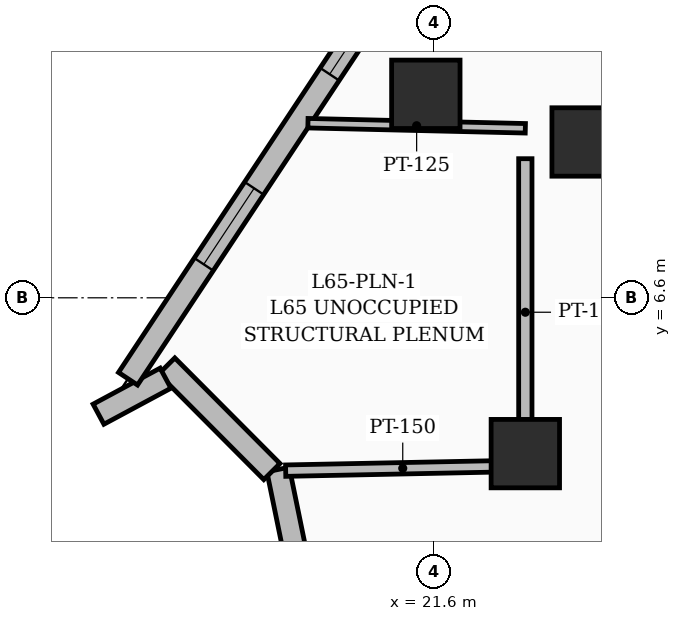
"""IFC4 building model, lengths in metres.
Left out: names, types, materials, properties, quantities, classifications, styles, units other than length and angle.
Written with IfcOpenShell. Run it as: python <this file> out.ifc"""

import sys

from ifc_helpers import new_model, si_unit, direction, frame, frame_2d, origin, origin_2d, place, context, subcontext, project, spatial, rectangle, extrude, element, fill, save


model = new_model("IFC4")
c1 = context("Model", 3, precision=1e-05, world=origin(), true_north=direction((0.0, 1.0)))
c2 = subcontext(c1, "Body", "Model", "MODEL_VIEW")
j1 = project(units=[si_unit("LENGTHUNIT", "METRE"), si_unit("PLANEANGLEUNIT", "RADIAN")], contexts=[c1])
p1 = place(None, origin())
s1 = spatial("IfcSite", under=j1, at=p1, CompositionType="ELEMENT")
p2 = place(p1, origin())
s2 = spatial("IfcBuilding", under=s1, at=p2, CompositionType="ELEMENT")
p3 = place(p2, frame((0.0, 0.0, 252.0)))
s3 = spatial("IfcBuildingStorey", under=s2, at=p3, CompositionType="ELEMENT", Elevation=252.0)
for number, where, z_axis, x_axis in (
    (1, (22.8, 4.55, 0.0), (0.0, 0.0, 1.0), (1.0, 0.0, 0.0)),
    (2, (23.6, 8.65, 0.0), (0.0, 0.0, 1.0), (1.0, 0.0, 0.0)),
    (3, (21.491, 9.277, 0.0), (0.0, 0.0, 1.0), (1.0, 0.0, 0.0)),
):
    element("IfcColumn", number, at=place(p3, frame(where, z_axis=z_axis, x_axis=x_axis)), inside=s3, PredefinedType="COLUMN", context=c2, shape_type="SweptSolid", body=[
        extrude(rectangle(XDim=0.9, YDim=0.9, at=origin_2d()), origin(), (0.0, 0.0, 1.0), 3.75),
    ])
p4 = place(p3, frame((19.946, 2.396, 0.0), z_axis=(0.0, 0.0, 1.0), x_axis=(-0.200962300898, 0.979598975917, 0.0)))
e4 = element("IfcWall", 4, at=p4, inside=s3, PredefinedType="SOLIDWALL", context=c2, shape_type="SweptSolid", body=[
    extrude(rectangle(XDim=1.985, YDim=0.3, at=frame_2d((0.993, 0.0))), origin(), (0.0, 0.0, 1.0), 3.5),
])
p5 = place(p3, frame((19.466, 4.314, 0.0), z_axis=(0.0, 0.0, 1.0), x_axis=(-0.705548527825, 0.708661608163, 0.0)))
e5 = element("IfcWall", 5, at=p5, inside=s3, PredefinedType="SOLIDWALL", context=c2, shape_type="SweptSolid", body=[
    extrude(rectangle(XDim=1.961, YDim=0.3, at=frame_2d((0.98, 0.0))), origin(), (0.0, 0.0, 1.0), 3.5),
])
p6 = place(p3, frame((18.066, 5.542, 0.0), z_axis=(0.0, 0.0, 1.0), x_axis=(-0.880815496191, -0.473459672696, 0.0)))
e6 = element("IfcWall", 6, at=p6, inside=s3, PredefinedType="SOLIDWALL", context=c2, shape_type="SweptSolid", body=[
    extrude(rectangle(XDim=1.001, YDim=0.3, at=frame_2d((0.5, 0.0))), origin(), (0.0, 0.0, 1.0), 3.5),
])
p7 = place(p3, frame((17.573, 5.535, 0.0), z_axis=(0.0, 0.0, 1.0), x_axis=(0.552079243774, 0.833791645793, 0.0)))
e7 = element("IfcWall", 7, at=p7, inside=s3, PredefinedType="SOLIDWALL", context=c2, shape_type="SweptSolid", body=[
    extrude(rectangle(XDim=6.843, YDim=0.3, at=frame_2d((3.421, 0.0))), origin(), (0.0, 0.0, 1.0), 3.5),
])
p8 = place(p7, frame((4.805, 0.0, 0.8)))
e8 = element("IfcOpeningElement", 8, at=p8, cuts=e7, PredefinedType="OPENING", context=c2, shape_type="SweptSolid", body=[
    extrude(rectangle(XDim=1.2, YDim=1.8, at=frame_2d((0.6, 0.9))), frame((0.0, 0.16, 0.0), z_axis=(0.0, -1.0, 0.0), x_axis=(1.0, 0.0, 0.0)), (0.0, 0.0, 1.0), 0.32),
])
p9 = place(p7, frame((1.805, 0.0, 0.8)))
e9 = element("IfcOpeningElement", 9, at=p9, cuts=e7, PredefinedType="OPENING", context=c2, shape_type="SweptSolid", body=[
    extrude(rectangle(XDim=1.2, YDim=1.8, at=frame_2d((0.6, 0.9))), frame((0.0, 0.16, 0.0), z_axis=(0.0, -1.0, 0.0), x_axis=(1.0, 0.0, 0.0)), (0.0, 0.0, 1.0), 0.32),
])
p10 = place(p3, frame((22.8, 8.43, 0.0), z_axis=(0.0, 0.0, 1.0), x_axis=(0.0, -1.0, 0.0)))
e10 = element("IfcWall", 10, at=p10, inside=s3, PredefinedType="PARTITIONING", context=c2, shape_type="SweptSolid", body=[
    extrude(rectangle(XDim=4.04, YDim=0.175, at=frame_2d((2.02, 0.0))), origin(), (0.0, 0.0, 1.0), 2.82),
])
p11 = place(p3, frame((22.728, 4.389, 0.0), z_axis=(0.0, 0.0, 1.0), x_axis=(-0.999792642329, -0.020363505237, 0.0)))
e11 = element("IfcWall", 11, at=p11, inside=s3, PredefinedType="PARTITIONING", context=c2, shape_type="SweptSolid", body=[
    extrude(rectangle(XDim=3.081, YDim=0.15, at=frame_2d((1.541, 0.0))), origin(), (0.0, 0.0, 1.0), 3.5),
])
p12 = place(p3, frame((19.94, 8.897, 0.0), z_axis=(0.0, 0.0, 1.0), x_axis=(0.999726593769, -0.023382423107, 0.0)))
e12 = element("IfcWall", 12, at=p12, inside=s3, PredefinedType="PARTITIONING", context=c2, shape_type="SweptSolid", body=[
    extrude(rectangle(XDim=2.861, YDim=0.125, at=frame_2d((1.43, 0.0))), origin(), (0.0, 0.0, 1.0), 2.764),
])
p13 = place(p8, origin())
e13 = element("IfcWindow", 13, at=p13, inside=s3, PartitioningType="SINGLE_PANEL", PredefinedType="WINDOW", context=c2, shape_type="SweptSolid", body=[
    extrude(rectangle(XDim=1.2, YDim=1.8, at=frame_2d((0.6, 0.9))), frame((0.0, 0.03, 0.0), z_axis=(0.0, -1.0, 0.0), x_axis=(1.0, 0.0, 0.0)), (0.0, 0.0, 1.0), 0.06),
])
fill(e8, e13)
p14 = place(p9, origin())
e14 = element("IfcWindow", 14, at=p14, inside=s3, PartitioningType="SINGLE_PANEL", PredefinedType="WINDOW", context=c2, shape_type="SweptSolid", body=[
    extrude(rectangle(XDim=1.2, YDim=1.8, at=frame_2d((0.6, 0.9))), frame((0.0, 0.03, 0.0), z_axis=(0.0, -1.0, 0.0), x_axis=(1.0, 0.0, 0.0)), (0.0, 0.0, 1.0), 0.06),
])
fill(e9, e14)
save(model, sys.argv[1])
